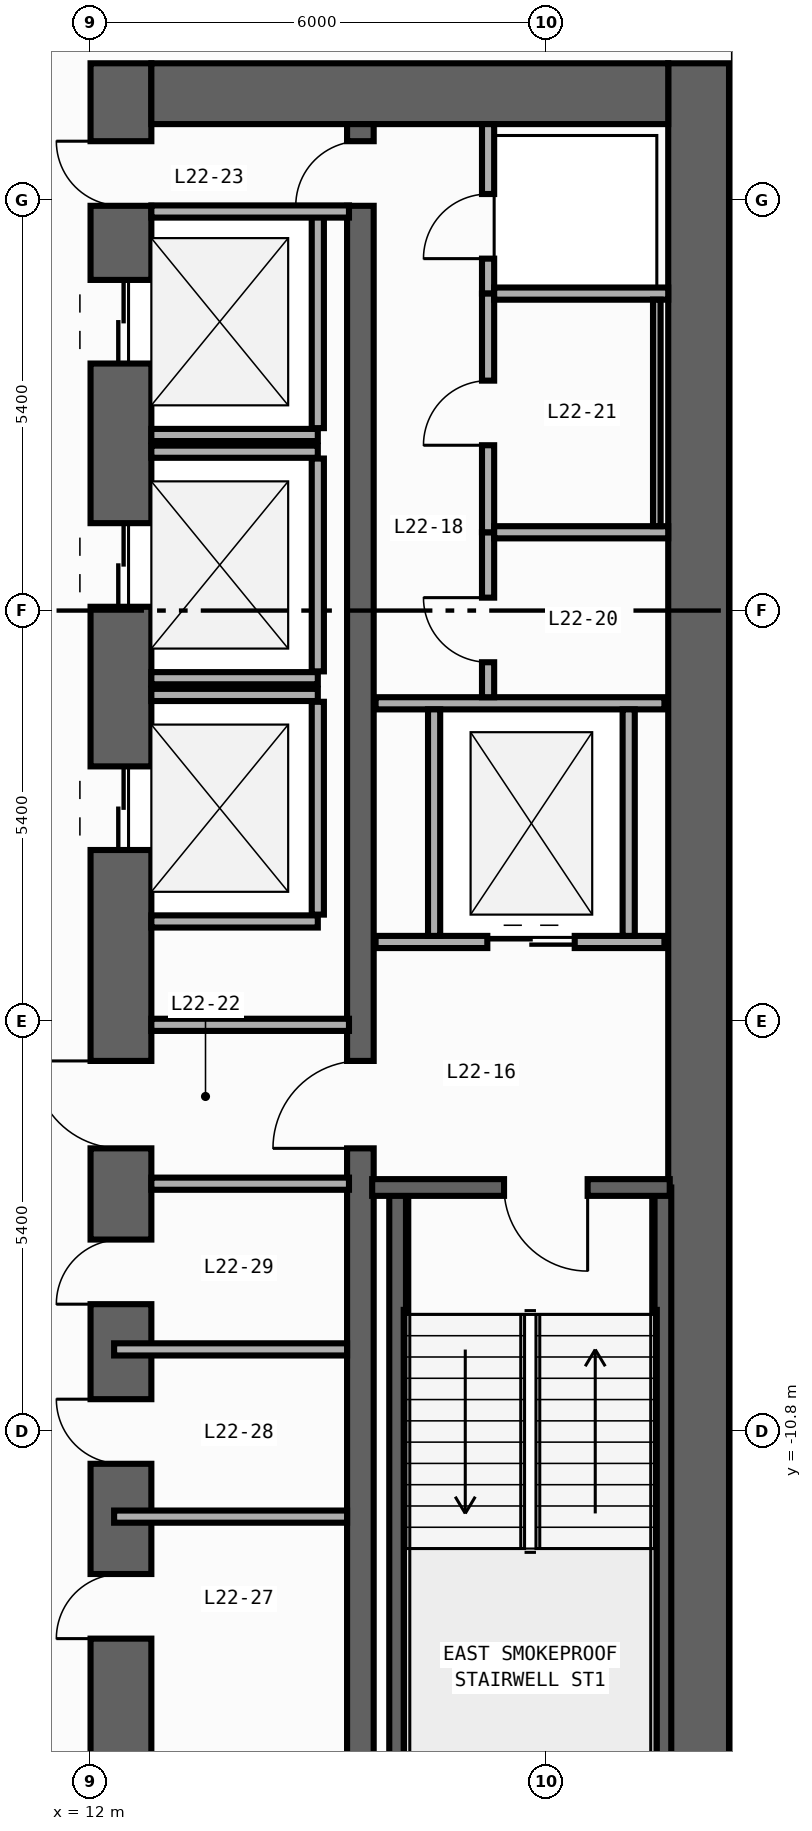
"""IFC4 building model, lengths in metres.
Left out: names, types, materials, properties, quantities, classifications, styles, units other than length and angle.
Written with IfcOpenShell. Run it as: python <this file> out.ifc"""

import sys

from ifc_helpers import new_model, si_unit, direction, frame, frame_2d, origin, place, context, subcontext, project, spatial, rectangle, extrude, element, fill, save


model = new_model("IFC4")
c1 = context("Model", 3, precision=1e-05, world=origin(), true_north=direction((0.0, 1.0)))
c2 = subcontext(c1, "Body", "Model", "MODEL_VIEW")
j1 = project(units=[si_unit("LENGTHUNIT", "METRE"), si_unit("PLANEANGLEUNIT", "RADIAN")], contexts=[c1])
p1 = place(None, origin())
s1 = spatial("IfcSite", under=j1, at=p1, CompositionType="ELEMENT")
p2 = place(p1, origin())
s2 = spatial("IfcBuilding", under=s1, at=p2, CompositionType="ELEMENT")
p3 = place(p2, frame((0.0, 0.0, 97.4)))
s3 = spatial("IfcBuildingStorey", under=s2, at=p3, CompositionType="ELEMENT", Elevation=97.4)
p4 = place(p3, frame((12.4, -19.8, 0.0), z_axis=(0.0, 0.0, 1.0), x_axis=(0.0, 1.0, 0.0)))
e1 = element("IfcWall", 1, at=p4, inside=s3, PredefinedType="SHEAR", context=c2, shape_type="SweptSolid", body=[
    extrude(rectangle(XDim=27.0, YDim=0.8, at=frame_2d((13.5, 0.0))), origin(), (0.0, 0.0, 1.0), 3.94),
])
p5 = place(p4, frame((23.05, 0.0, 0.0)))
e2 = element("IfcOpeningElement", 2, at=p5, cuts=e1, PredefinedType="OPENING", context=c2, shape_type="SweptSolid", body=[
    extrude(rectangle(XDim=1.1, YDim=2.2, at=frame_2d((0.55, 1.1))), frame((0.0, 0.41, 0.0), z_axis=(0.0, -1.0, 0.0), x_axis=(1.0, 0.0, 0.0)), (0.0, 0.0, 1.0), 0.82),
])
p6 = place(p4, frame((19.85, 0.0, 0.0)))
e3 = element("IfcOpeningElement", 3, at=p6, cuts=e1, PredefinedType="OPENING", context=c2, shape_type="SweptSolid", body=[
    extrude(rectangle(XDim=1.1, YDim=2.2, at=frame_2d((0.55, 1.1))), frame((0.0, 0.41, 0.0), z_axis=(0.0, -1.0, 0.0), x_axis=(1.0, 0.0, 0.0)), (0.0, 0.0, 1.0), 0.82),
])
p7 = place(p4, frame((16.65, 0.0, 0.0)))
e4 = element("IfcOpeningElement", 4, at=p7, cuts=e1, PredefinedType="OPENING", context=c2, shape_type="SweptSolid", body=[
    extrude(rectangle(XDim=1.1, YDim=2.2, at=frame_2d((0.55, 1.1))), frame((0.0, 0.41, 0.0), z_axis=(0.0, -1.0, 0.0), x_axis=(1.0, 0.0, 0.0)), (0.0, 0.0, 1.0), 0.82),
])
p8 = place(p4, frame((6.275, 0.0, 0.0)))
e5 = element("IfcOpeningElement", 5, at=p8, cuts=e1, PredefinedType="OPENING", context=c2, shape_type="SweptSolid", body=[
    extrude(rectangle(XDim=0.85, YDim=2.1, at=frame_2d((0.425, 1.05))), frame((0.0, 0.41, 0.0), z_axis=(0.0, -1.0, 0.0), x_axis=(1.0, 0.0, 0.0)), (0.0, 0.0, 1.0), 0.82),
])
p9 = place(p4, frame((8.575, 0.0, 0.0)))
e6 = element("IfcOpeningElement", 6, at=p9, cuts=e1, PredefinedType="OPENING", context=c2, shape_type="SweptSolid", body=[
    extrude(rectangle(XDim=0.85, YDim=2.1, at=frame_2d((0.425, 1.05))), frame((0.0, 0.41, 0.0), z_axis=(0.0, -1.0, 0.0), x_axis=(1.0, 0.0, 0.0)), (0.0, 0.0, 1.0), 0.82),
])
p10 = place(p4, frame((10.675, 0.0, 0.0)))
e7 = element("IfcOpeningElement", 7, at=p10, cuts=e1, PredefinedType="OPENING", context=c2, shape_type="SweptSolid", body=[
    extrude(rectangle(XDim=0.85, YDim=2.1, at=frame_2d((0.425, 1.05))), frame((0.0, 0.41, 0.0), z_axis=(0.0, -1.0, 0.0), x_axis=(1.0, 0.0, 0.0)), (0.0, 0.0, 1.0), 0.82),
])
p11 = place(p4, frame((12.725, 0.0, 0.0)))
e8 = element("IfcOpeningElement", 8, at=p11, cuts=e1, PredefinedType="OPENING", context=c2, shape_type="SweptSolid", body=[
    extrude(rectangle(XDim=1.15, YDim=2.2, at=frame_2d((0.575, 1.1))), frame((0.0, 0.41, 0.0), z_axis=(0.0, -1.0, 0.0), x_axis=(1.0, 0.0, 0.0)), (0.0, 0.0, 1.0), 0.82),
])
p12 = place(p4, frame((25.125, 0.0, 0.0)))
e9 = element("IfcOpeningElement", 9, at=p12, cuts=e1, PredefinedType="OPENING", context=c2, shape_type="SweptSolid", body=[
    extrude(rectangle(XDim=0.85, YDim=2.1, at=frame_2d((0.425, 1.05))), frame((0.0, 0.41, 0.0), z_axis=(0.0, -1.0, 0.0), x_axis=(1.0, 0.0, 0.0)), (0.0, 0.0, 1.0), 0.82),
])
p13 = place(p3, frame((20.0, -19.8, 0.0), z_axis=(0.0, 0.0, 1.0), x_axis=(0.0, 1.0, 0.0)))
e10 = element("IfcWall", 10, at=p13, inside=s3, PredefinedType="SHEAR", context=c2, shape_type="SweptSolid", body=[
    extrude(rectangle(XDim=27.0, YDim=0.8, at=frame_2d((13.5, 0.0))), origin(), (0.0, 0.0, 1.0), 3.94),
])
p14 = place(p3, frame((12.8, 6.8, 0.0), z_axis=(0.0, 0.0, 1.0), x_axis=(1.0, 0.0, 0.0)))
e11 = element("IfcWall", 11, at=p14, inside=s3, PredefinedType="SHEAR", context=c2, shape_type="SweptSolid", body=[
    extrude(rectangle(XDim=6.8, YDim=0.8, at=frame_2d((3.4, 0.0))), origin(), (0.0, 0.0, 1.0), 3.94),
])
p15 = place(p3, frame((15.55, -19.0, 0.0), z_axis=(0.0, 0.0, 1.0), x_axis=(0.0, 1.0, 0.0)))
e12 = element("IfcWall", 12, at=p15, inside=s3, PredefinedType="SHEAR", context=c2, shape_type="SweptSolid", body=[
    extrude(rectangle(XDim=25.4, YDim=0.35, at=frame_2d((12.7, 0.0))), origin(), (0.0, 0.0, 1.0), 3.94),
])
p16 = place(p15, frame((11.925, 0.0, 0.0)))
e13 = element("IfcOpeningElement", 13, at=p16, cuts=e12, PredefinedType="OPENING", context=c2, shape_type="SweptSolid", body=[
    extrude(rectangle(XDim=1.15, YDim=2.2, at=frame_2d((0.575, 1.1))), frame((0.0, 0.185, 0.0), z_axis=(0.0, -1.0, 0.0), x_axis=(1.0, 0.0, 0.0)), (0.0, 0.0, 1.0), 0.37),
])
p17 = place(p15, frame((24.325, 0.0, 0.0)))
e14 = element("IfcOpeningElement", 14, at=p17, cuts=e12, PredefinedType="OPENING", context=c2, shape_type="SweptSolid", body=[
    extrude(rectangle(XDim=0.85, YDim=2.1, at=frame_2d((0.425, 1.05))), frame((0.0, 0.185, 0.0), z_axis=(0.0, -1.0, 0.0), x_axis=(1.0, 0.0, 0.0)), (0.0, 0.0, 1.0), 0.37),
])
for number, where, z_axis, x_axis in (
    (15, (16.04, -18.89, 0.0), (0.0, 0.0, 1.0), (0.0, 1.0, 0.0)),
    (16, (19.53, -18.89, 0.0), (0.0, 0.0, 1.0), (0.0, 1.0, 0.0)),
):
    element("IfcWall", number, at=place(p3, frame(where, z_axis=z_axis, x_axis=x_axis)), inside=s3, PredefinedType="SHEAR", context=c2, shape_type="SweptSolid", body=[
        extrude(rectangle(XDim=11.3, YDim=0.22, at=frame_2d((5.65, 0.0))), origin(), (0.0, 0.0, 1.0), 3.94),
    ])
p18 = place(p3, frame((19.62, -7.59, 0.0), z_axis=(0.0, 0.0, 1.0), x_axis=(-1.0, 0.0, 0.0)))
e17 = element("IfcWall", 17, at=p18, inside=s3, PredefinedType="SHEAR", context=c2, shape_type="SweptSolid", body=[
    extrude(rectangle(XDim=3.915, YDim=0.22, at=frame_2d((1.958, 0.0))), origin(), (0.0, 0.0, 1.0), 3.94),
])
p19 = place(p18, frame((1.08, 0.0, 0.0)))
e18 = element("IfcOpeningElement", 18, at=p19, cuts=e17, PredefinedType="OPENING", context=c2, shape_type="SweptSolid", body=[
    extrude(rectangle(XDim=1.1, YDim=2.2, at=frame_2d((0.55, 1.1))), frame((0.0, 0.12, 0.0), z_axis=(0.0, -1.0, 0.0), x_axis=(1.0, 0.0, 0.0)), (0.0, 0.0, 1.0), 0.24),
])
p20 = place(p3, frame((12.8, 2.31, 0.0), z_axis=(0.0, 0.0, 1.0), x_axis=(1.0, 0.0, 0.0)))
e19 = element("IfcWall", 19, at=p20, inside=s3, PredefinedType="STANDARD", context=c2, shape_type="SweptSolid", body=[
    extrude(rectangle(XDim=2.19, YDim=0.16, at=frame_2d((1.095, 0.0))), origin(), (0.0, 0.0, 1.0), 3.94),
])
p21 = place(p3, frame((14.99, 2.4, 0.0), z_axis=(0.0, 0.0, 1.0), x_axis=(0.0, 1.0, 0.0)))
e20 = element("IfcWall", 20, at=p21, inside=s3, PredefinedType="STANDARD", context=c2, shape_type="SweptSolid", body=[
    extrude(rectangle(XDim=2.8, YDim=0.16, at=frame_2d((1.4, 0.0))), origin(), (0.0, 0.0, 1.0), 3.94),
])
for number, where, z_axis, x_axis in (
    (21, (12.8, -0.89, 0.0), (0.0, 0.0, 1.0), (1.0, 0.0, 0.0)),
    (22, (12.8, 2.09, 0.0), (0.0, 0.0, 1.0), (1.0, 0.0, 0.0)),
):
    element("IfcWall", number, at=place(p3, frame(where, z_axis=z_axis, x_axis=x_axis)), inside=s3, PredefinedType="STANDARD", context=c2, shape_type="SweptSolid", body=[
        extrude(rectangle(XDim=2.19, YDim=0.16, at=frame_2d((1.095, 0.0))), origin(), (0.0, 0.0, 1.0), 3.94),
    ])
p22 = place(p3, frame((14.99, -0.8, 0.0), z_axis=(0.0, 0.0, 1.0), x_axis=(0.0, 1.0, 0.0)))
e23 = element("IfcWall", 23, at=p22, inside=s3, PredefinedType="STANDARD", context=c2, shape_type="SweptSolid", body=[
    extrude(rectangle(XDim=2.8, YDim=0.16, at=frame_2d((1.4, 0.0))), origin(), (0.0, 0.0, 1.0), 3.94),
])
for number, where, z_axis, x_axis in (
    (24, (12.8, -4.09, 0.0), (0.0, 0.0, 1.0), (1.0, 0.0, 0.0)),
    (25, (12.8, -1.11, 0.0), (0.0, 0.0, 1.0), (1.0, 0.0, 0.0)),
):
    element("IfcWall", number, at=place(p3, frame(where, z_axis=z_axis, x_axis=x_axis)), inside=s3, PredefinedType="STANDARD", context=c2, shape_type="SweptSolid", body=[
        extrude(rectangle(XDim=2.19, YDim=0.16, at=frame_2d((1.095, 0.0))), origin(), (0.0, 0.0, 1.0), 3.94),
    ])
p23 = place(p3, frame((14.99, -4.0, 0.0), z_axis=(0.0, 0.0, 1.0), x_axis=(0.0, 1.0, 0.0)))
e26 = element("IfcWall", 26, at=p23, inside=s3, PredefinedType="STANDARD", context=c2, shape_type="SweptSolid", body=[
    extrude(rectangle(XDim=2.8, YDim=0.16, at=frame_2d((1.4, 0.0))), origin(), (0.0, 0.0, 1.0), 3.94),
])
p24 = place(p3, frame((15.75, -4.36, 0.0), z_axis=(0.0, 0.0, 1.0), x_axis=(1.0, 0.0, 0.0)))
e27 = element("IfcWall", 27, at=p24, inside=s3, PredefinedType="STANDARD", context=c2, shape_type="SweptSolid", body=[
    extrude(rectangle(XDim=3.8, YDim=0.16, at=frame_2d((1.9, 0.0))), origin(), (0.0, 0.0, 1.0), 3.94),
])
p25 = place(p24, frame((1.47, 0.0, 0.0)))
e28 = element("IfcOpeningElement", 28, at=p25, cuts=e27, PredefinedType="OPENING", context=c2, shape_type="SweptSolid", body=[
    extrude(rectangle(XDim=1.15, YDim=2.2, at=frame_2d((0.575, 1.1))), frame((0.0, 0.09, 0.0), z_axis=(0.0, -1.0, 0.0), x_axis=(1.0, 0.0, 0.0)), (0.0, 0.0, 1.0), 0.18),
])
p26 = place(p3, frame((15.75, -1.22, 0.0), z_axis=(0.0, 0.0, 1.0), x_axis=(1.0, 0.0, 0.0)))
e29 = element("IfcWall", 29, at=p26, inside=s3, PredefinedType="STANDARD", context=c2, shape_type="SweptSolid", body=[
    extrude(rectangle(XDim=3.8, YDim=0.16, at=frame_2d((1.9, 0.0))), origin(), (0.0, 0.0, 1.0), 3.94),
])
for number, where, z_axis, x_axis in (
    (30, (16.52, -4.28, 0.0), (0.0, 0.0, 1.0), (0.0, 1.0, 0.0)),
    (31, (19.08, -4.28, 0.0), (0.0, 0.0, 1.0), (0.0, 1.0, 0.0)),
):
    element("IfcWall", number, at=place(p3, frame(where, z_axis=z_axis, x_axis=x_axis)), inside=s3, PredefinedType="STANDARD", context=c2, shape_type="SweptSolid", body=[
        extrude(rectangle(XDim=2.98, YDim=0.16, at=frame_2d((1.49, 0.0))), origin(), (0.0, 0.0, 1.0), 3.94),
    ])
for number, where, z_axis, x_axis in (
    (32, (12.8, -5.45, 0.0), (0.0, 0.0, 1.0), (1.0, 0.0, 0.0)),
    (33, (12.8, -7.54, 0.0), (0.0, 0.0, 1.0), (1.0, 0.0, 0.0)),
    (34, (12.8, 5.25, 0.0), (0.0, 0.0, 1.0), (1.0, 0.0, 0.0)),
):
    element("IfcWall", number, at=place(p3, frame(where, z_axis=z_axis, x_axis=x_axis)), inside=s3, PredefinedType="STANDARD", context=c2, shape_type="SweptSolid", body=[
        extrude(rectangle(XDim=2.6, YDim=0.16, at=frame_2d((1.3, 0.0))), origin(), (0.0, 0.0, 1.0), 3.94),
    ])
p27 = place(p3, frame((17.23, 4.17, 0.0), z_axis=(0.0, 0.0, 1.0), x_axis=(0.0, 1.0, 0.0)))
e35 = element("IfcWall", 35, at=p27, inside=s3, PredefinedType="PARTITIONING", context=c2, shape_type="SweptSolid", body=[
    extrude(rectangle(XDim=2.23, YDim=0.16, at=frame_2d((1.115, 0.0))), origin(), (0.0, 0.0, 1.0), 3.94),
])
p28 = place(p27, frame((0.46, 0.0, 0.0)))
e36 = element("IfcOpeningElement", 36, at=p28, cuts=e35, PredefinedType="OPENING", context=c2, shape_type="SweptSolid", body=[
    extrude(rectangle(XDim=0.85, YDim=2.1, at=frame_2d((0.425, 1.05))), frame((0.0, 0.09, 0.0), z_axis=(0.0, -1.0, 0.0), x_axis=(1.0, 0.0, 0.0)), (0.0, 0.0, 1.0), 0.18),
])
p29 = place(p3, frame((17.23, -1.14, 0.0), z_axis=(0.0, 0.0, 1.0), x_axis=(0.0, 1.0, 0.0)))
e37 = element("IfcWall", 37, at=p29, inside=s3, PredefinedType="PARTITIONING", context=c2, shape_type="SweptSolid", body=[
    extrude(rectangle(XDim=2.17, YDim=0.16, at=frame_2d((1.085, 0.0))), origin(), (0.0, 0.0, 1.0), 3.94),
])
p30 = place(p29, frame((0.46, 0.0, 0.0)))
e38 = element("IfcOpeningElement", 38, at=p30, cuts=e37, PredefinedType="OPENING", context=c2, shape_type="SweptSolid", body=[
    extrude(rectangle(XDim=0.85, YDim=2.1, at=frame_2d((0.425, 1.05))), frame((0.0, 0.09, 0.0), z_axis=(0.0, -1.0, 0.0), x_axis=(1.0, 0.0, 0.0)), (0.0, 0.0, 1.0), 0.18),
])
p31 = place(p3, frame((17.23, 1.03, 0.0), z_axis=(0.0, 0.0, 1.0), x_axis=(0.0, 1.0, 0.0)))
e39 = element("IfcWall", 39, at=p31, inside=s3, PredefinedType="PARTITIONING", context=c2, shape_type="SweptSolid", body=[
    extrude(rectangle(XDim=3.14, YDim=0.16, at=frame_2d((1.57, 0.0))), origin(), (0.0, 0.0, 1.0), 3.94),
])
p32 = place(p31, frame((1.145, 0.0, 0.0)))
e40 = element("IfcOpeningElement", 40, at=p32, cuts=e39, PredefinedType="OPENING", context=c2, shape_type="SweptSolid", body=[
    extrude(rectangle(XDim=0.85, YDim=2.1, at=frame_2d((0.425, 1.05))), frame((0.0, 0.09, 0.0), z_axis=(0.0, -1.0, 0.0), x_axis=(1.0, 0.0, 0.0)), (0.0, 0.0, 1.0), 0.18),
])
for number, where, z_axis, x_axis in (
    (41, (17.31, 4.17, 0.0), (0.0, 0.0, 1.0), (1.0, 0.0, 0.0)),
    (42, (17.31, 1.03, 0.0), (0.0, 0.0, 1.0), (1.0, 0.0, 0.0)),
):
    element("IfcWall", number, at=place(p3, frame(where, z_axis=z_axis, x_axis=x_axis)), inside=s3, PredefinedType="PARTITIONING", context=c2, shape_type="SweptSolid", body=[
        extrude(rectangle(XDim=2.29, YDim=0.16, at=frame_2d((1.145, 0.0))), origin(), (0.0, 0.0, 1.0), 3.94),
    ])
for number, where, z_axis, x_axis in (
    (43, (12.31, -11.92, 0.0), (0.0, 0.0, 1.0), (1.0, 0.0, 0.0)),
    (44, (12.31, -9.72, 0.0), (0.0, 0.0, 1.0), (1.0, 0.0, 0.0)),
):
    element("IfcWall", number, at=place(p3, frame(where, z_axis=z_axis, x_axis=x_axis)), inside=s3, PredefinedType="PARTITIONING", context=c2, shape_type="SweptSolid", body=[
        extrude(rectangle(XDim=3.065, YDim=0.16, at=frame_2d((1.532, 0.0))), origin(), (0.0, 0.0, 1.0), 3.94),
    ])
p33 = place(p3, frame((19.45, 4.09, 0.0), z_axis=(0.0, 0.0, 1.0), x_axis=(0.0, -1.0, 0.0)))
e45 = element("IfcWall", 45, at=p33, inside=s3, PredefinedType="PARTITIONING", context=c2, shape_type="SweptSolid", body=[
    extrude(rectangle(XDim=2.98, YDim=0.1, at=frame_2d((1.49, 0.0))), origin(), (0.0, 0.0, 1.0), 3.94),
])
p34 = place(p19, origin())
e46 = element("IfcDoor", 46, at=p34, inside=s3, OperationType="SINGLE_SWING_LEFT", PredefinedType="DOOR", context=c2, shape_type="SweptSolid", body=[
    extrude(rectangle(XDim=1.1, YDim=2.2, at=frame_2d((0.55, 1.1))), frame((0.0, 0.025, 0.0), z_axis=(0.0, -1.0, 0.0), x_axis=(1.0, 0.0, 0.0)), (0.0, 0.0, 1.0), 0.05),
])
fill(e18, e46)
p35 = place(p5, origin())
e47 = element("IfcDoor", 47, at=p35, inside=s3, OperationType="DOUBLE_DOOR_SLIDING", PredefinedType="DOOR", context=c2, shape_type="SweptSolid", body=[
    extrude(rectangle(XDim=1.1, YDim=2.2, at=frame_2d((0.55, 1.1))), frame((0.0, 0.025, 0.0), z_axis=(0.0, -1.0, 0.0), x_axis=(1.0, 0.0, 0.0)), (0.0, 0.0, 1.0), 0.05),
])
fill(e2, e47)
p36 = place(p6, origin())
e48 = element("IfcDoor", 48, at=p36, inside=s3, OperationType="DOUBLE_DOOR_SLIDING", PredefinedType="DOOR", context=c2, shape_type="SweptSolid", body=[
    extrude(rectangle(XDim=1.1, YDim=2.2, at=frame_2d((0.55, 1.1))), frame((0.0, 0.025, 0.0), z_axis=(0.0, -1.0, 0.0), x_axis=(1.0, 0.0, 0.0)), (0.0, 0.0, 1.0), 0.05),
])
fill(e3, e48)
p37 = place(p7, origin())
e49 = element("IfcDoor", 49, at=p37, inside=s3, OperationType="DOUBLE_DOOR_SLIDING", PredefinedType="DOOR", context=c2, shape_type="SweptSolid", body=[
    extrude(rectangle(XDim=1.1, YDim=2.2, at=frame_2d((0.55, 1.1))), frame((0.0, 0.025, 0.0), z_axis=(0.0, -1.0, 0.0), x_axis=(1.0, 0.0, 0.0)), (0.0, 0.0, 1.0), 0.05),
])
fill(e4, e49)
p38 = place(p8, origin())
e50 = element("IfcDoor", 50, at=p38, inside=s3, OperationType="SINGLE_SWING_LEFT", PredefinedType="DOOR", context=c2, shape_type="SweptSolid", body=[
    extrude(rectangle(XDim=0.85, YDim=2.1, at=frame_2d((0.425, 1.05))), frame((0.0, 0.025, 0.0), z_axis=(0.0, -1.0, 0.0), x_axis=(1.0, 0.0, 0.0)), (0.0, 0.0, 1.0), 0.05),
])
fill(e5, e50)
p39 = place(p9, origin())
e51 = element("IfcDoor", 51, at=p39, inside=s3, OperationType="SINGLE_SWING_RIGHT", PredefinedType="DOOR", context=c2, shape_type="SweptSolid", body=[
    extrude(rectangle(XDim=0.85, YDim=2.1, at=frame_2d((0.425, 1.05))), frame((0.0, 0.025, 0.0), z_axis=(0.0, -1.0, 0.0), x_axis=(1.0, 0.0, 0.0)), (0.0, 0.0, 1.0), 0.05),
])
fill(e6, e51)
p40 = place(p10, origin())
e52 = element("IfcDoor", 52, at=p40, inside=s3, OperationType="SINGLE_SWING_LEFT", PredefinedType="DOOR", context=c2, shape_type="SweptSolid", body=[
    extrude(rectangle(XDim=0.85, YDim=2.1, at=frame_2d((0.425, 1.05))), frame((0.0, 0.025, 0.0), z_axis=(0.0, -1.0, 0.0), x_axis=(1.0, 0.0, 0.0)), (0.0, 0.0, 1.0), 0.05),
])
fill(e7, e52)
p41 = place(p11, origin())
e53 = element("IfcDoor", 53, at=p41, inside=s3, OperationType="SINGLE_SWING_RIGHT", PredefinedType="DOOR", context=c2, shape_type="SweptSolid", body=[
    extrude(rectangle(XDim=1.15, YDim=2.2, at=frame_2d((0.575, 1.1))), frame((0.0, 0.025, 0.0), z_axis=(0.0, -1.0, 0.0), x_axis=(1.0, 0.0, 0.0)), (0.0, 0.0, 1.0), 0.05),
])
fill(e8, e53)
p42 = place(p16, origin())
e54 = element("IfcDoor", 54, at=p42, inside=s3, OperationType="SINGLE_SWING_LEFT", PredefinedType="DOOR", context=c2, shape_type="SweptSolid", body=[
    extrude(rectangle(XDim=1.15, YDim=2.2, at=frame_2d((0.575, 1.1))), frame((0.0, 0.025, 0.0), z_axis=(0.0, -1.0, 0.0), x_axis=(1.0, 0.0, 0.0)), (0.0, 0.0, 1.0), 0.05),
])
fill(e13, e54)
p43 = place(p12, origin())
e55 = element("IfcDoor", 55, at=p43, inside=s3, OperationType="SINGLE_SWING_RIGHT", PredefinedType="DOOR", context=c2, shape_type="SweptSolid", body=[
    extrude(rectangle(XDim=0.85, YDim=2.1, at=frame_2d((0.425, 1.05))), frame((0.0, 0.025, 0.0), z_axis=(0.0, -1.0, 0.0), x_axis=(1.0, 0.0, 0.0)), (0.0, 0.0, 1.0), 0.05),
])
fill(e9, e55)
p44 = place(p17, origin())
e56 = element("IfcDoor", 56, at=p44, inside=s3, OperationType="SINGLE_SWING_LEFT", PredefinedType="DOOR", context=c2, shape_type="SweptSolid", body=[
    extrude(rectangle(XDim=0.85, YDim=2.1, at=frame_2d((0.425, 1.05))), frame((0.0, 0.025, 0.0), z_axis=(0.0, -1.0, 0.0), x_axis=(1.0, 0.0, 0.0)), (0.0, 0.0, 1.0), 0.05),
])
fill(e14, e56)
p45 = place(p25, origin())
e57 = element("IfcDoor", 57, at=p45, inside=s3, OperationType="DOUBLE_DOOR_SLIDING", PredefinedType="DOOR", context=c2, shape_type="SweptSolid", body=[
    extrude(rectangle(XDim=1.15, YDim=2.2, at=frame_2d((0.575, 1.1))), frame((0.0, 0.025, 0.0), z_axis=(0.0, -1.0, 0.0), x_axis=(1.0, 0.0, 0.0)), (0.0, 0.0, 1.0), 0.05),
])
fill(e28, e57)
p46 = place(p28, origin())
e58 = element("IfcDoor", 58, at=p46, inside=s3, OperationType="SINGLE_SWING_LEFT", PredefinedType="DOOR", context=c2, shape_type="SweptSolid", body=[
    extrude(rectangle(XDim=0.85, YDim=2.1, at=frame_2d((0.425, 1.05))), frame((0.0, 0.025, 0.0), z_axis=(0.0, -1.0, 0.0), x_axis=(1.0, 0.0, 0.0)), (0.0, 0.0, 1.0), 0.05),
])
fill(e36, e58)
p47 = place(p30, origin())
e59 = element("IfcDoor", 59, at=p47, inside=s3, OperationType="SINGLE_SWING_RIGHT", PredefinedType="DOOR", context=c2, shape_type="SweptSolid", body=[
    extrude(rectangle(XDim=0.85, YDim=2.1, at=frame_2d((0.425, 1.05))), frame((0.0, 0.025, 0.0), z_axis=(0.0, -1.0, 0.0), x_axis=(1.0, 0.0, 0.0)), (0.0, 0.0, 1.0), 0.05),
])
fill(e38, e59)
p48 = place(p32, origin())
e60 = element("IfcDoor", 60, at=p48, inside=s3, OperationType="SINGLE_SWING_LEFT", PredefinedType="DOOR", context=c2, shape_type="SweptSolid", body=[
    extrude(rectangle(XDim=0.85, YDim=2.1, at=frame_2d((0.425, 1.05))), frame((0.0, 0.025, 0.0), z_axis=(0.0, -1.0, 0.0), x_axis=(1.0, 0.0, 0.0)), (0.0, 0.0, 1.0), 0.05),
])
fill(e40, e60)
save(model, sys.argv[1])
